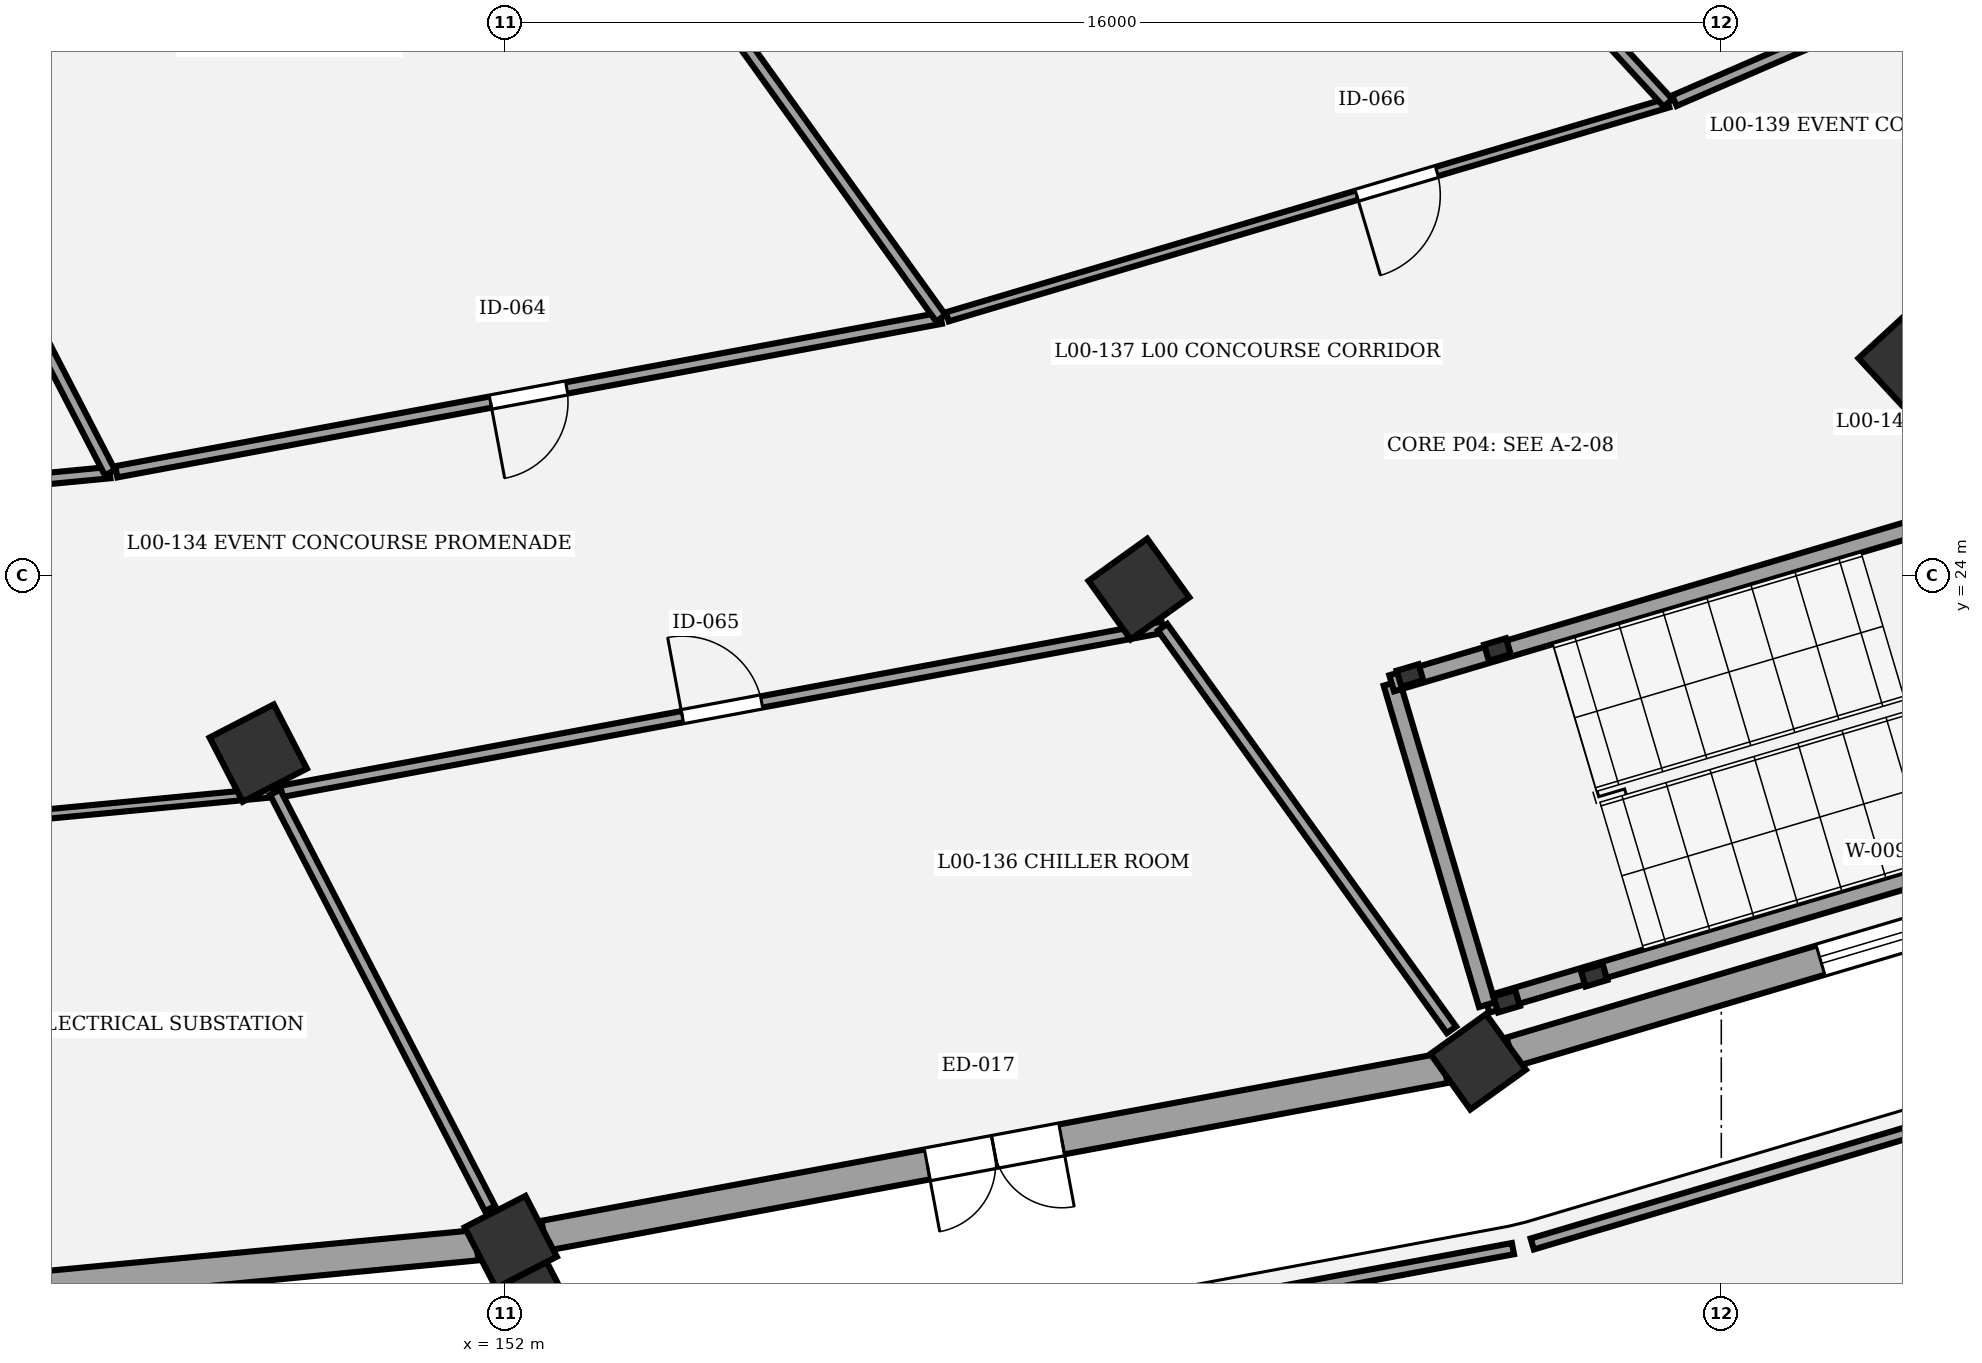
"""IFC4 building model, lengths in metres.
Left out: names, types, materials, properties, quantities, classifications, styles, units other than length and angle.
Written with IfcOpenShell. Run it as: python <this file> out.ifc"""

import sys

from ifc_helpers import new_model, si_unit, direction, frame, frame_2d, origin, origin_2d, place, context, subcontext, project, spatial, rectangle, extrude, element, fill, save


model = new_model("IFC4")
c1 = context("Model", 3, precision=1e-05, world=origin(), true_north=direction((0.0, 1.0)))
c2 = subcontext(c1, "Body", "Model", "MODEL_VIEW")
j1 = project(units=[si_unit("LENGTHUNIT", "METRE"), si_unit("PLANEANGLEUNIT", "RADIAN")], contexts=[c1])
p1 = place(None, origin())
s1 = spatial("IfcSite", under=j1, at=p1, CompositionType="ELEMENT")
p2 = place(p1, origin())
s2 = spatial("IfcBuilding", under=s1, at=p2, CompositionType="ELEMENT")
p3 = place(p2, origin())
s3 = spatial("IfcBuildingStorey", under=s2, at=p3, CompositionType="ELEMENT", Elevation=0.0)
p4 = place(p3, frame((148.75, 21.665, 0.0), z_axis=(0.0, 0.0, 1.0), x_axis=(0.458959712465, -0.888457079624, 0.0)))
e1 = element("IfcColumn", 1, at=p4, inside=s3, PredefinedType="COLUMN", context=c2, shape_type="SweptSolid", body=[
    extrude(rectangle(XDim=0.95, YDim=0.95, at=origin_2d()), origin(), (0.0, 0.0, 1.0), 5.4),
])
p5 = place(p3, frame((152.073, 15.233, 0.0), z_axis=(0.0, 0.0, 1.0), x_axis=(0.458959712465, -0.888457079624, 0.0)))
e2 = element("IfcColumn", 2, at=p5, inside=s3, PredefinedType="COLUMN", context=c2, shape_type="SweptSolid", body=[
    extrude(rectangle(XDim=0.9, YDim=0.9, at=origin_2d()), origin(), (0.0, 0.0, 1.0), 5.4),
])
p6 = place(p3, frame((152.373, 14.652, 0.0), z_axis=(0.0, 0.0, 1.0), x_axis=(0.888457079624, 0.458959712465, 0.0)))
e3 = element("IfcColumn", 3, at=p6, inside=s3, PredefinedType="PILASTER", context=c2, shape_type="SweptSolid", body=[
    extrude(rectangle(XDim=0.6, YDim=0.4, at=origin_2d()), origin(), (0.0, 0.0, 1.0), 5.4),
])
p7 = place(p3, frame((160.338, 23.823, 0.0), z_axis=(0.0, 0.0, 1.0), x_axis=(0.582974127943, -0.812490717577, 0.0)))
e4 = element("IfcColumn", 4, at=p7, inside=s3, PredefinedType="COLUMN", context=c2, shape_type="SweptSolid", body=[
    extrude(rectangle(XDim=0.95, YDim=0.95, at=origin_2d()), origin(), (0.0, 0.0, 1.0), 5.4),
])
p8 = place(p3, frame((164.801, 17.603, 0.0), z_axis=(0.0, 0.0, 1.0), x_axis=(0.582974127943, -0.812490717577, 0.0)))
e5 = element("IfcColumn", 5, at=p8, inside=s3, PredefinedType="COLUMN", context=c2, shape_type="SweptSolid", body=[
    extrude(rectangle(XDim=0.9, YDim=0.9, at=origin_2d()), origin(), (0.0, 0.0, 1.0), 5.4),
])
p9 = place(p3, frame((170.476, 26.832, 0.0), z_axis=(0.0, 0.0, 1.0), x_axis=(0.677903094969, -0.735151272753, 0.0)))
e6 = element("IfcColumn", 6, at=p9, inside=s3, PredefinedType="COLUMN", context=c2, shape_type="SweptSolid", body=[
    extrude(rectangle(XDim=0.95, YDim=0.95, at=origin_2d()), origin(), (0.0, 0.0, 1.0), 5.4),
])
p10 = place(p3, frame((151.627, 15.19, 0.0), z_axis=(0.0, 0.0, 1.0), x_axis=(-0.995482650467, -0.094943628644, 0.0)))
e7 = element("IfcWall", 7, at=p10, inside=s3, PredefinedType="STANDARD", context=c2, shape_type="SweptSolid", body=[
    extrude(rectangle(XDim=14.13, YDim=0.4, at=frame_2d((7.065, 0.0))), origin(), (0.0, 0.0, 1.0), 4.25),
])
p11 = place(p10, frame((6.215, 0.0, 0.0)))
e8 = element("IfcOpeningElement", 8, at=p11, cuts=e7, PredefinedType="OPENING", context=c2, shape_type="SweptSolid", body=[
    extrude(rectangle(XDim=1.7, YDim=2.35, at=frame_2d((0.85, 1.175))), frame((0.0, 0.21, 0.0), z_axis=(0.0, -1.0, 0.0), x_axis=(1.0, 0.0, 0.0)), (0.0, 0.0, 1.0), 0.42),
])
p12 = place(p3, frame((164.361, 17.521, 0.0), z_axis=(0.0, 0.0, 1.0), x_axis=(-0.983098943476, -0.183075031985, 0.0)))
e9 = element("IfcWall", 9, at=p12, inside=s3, PredefinedType="STANDARD", context=c2, shape_type="SweptSolid", body=[
    extrude(rectangle(XDim=12.051, YDim=0.4, at=frame_2d((6.026, 0.0))), origin(), (0.0, 0.0, 1.0), 4.25),
])
p13 = place(p12, frame((5.126, 0.0, 0.0)))
e10 = element("IfcOpeningElement", 10, at=p13, cuts=e9, PredefinedType="OPENING", context=c2, shape_type="SweptSolid", body=[
    extrude(rectangle(XDim=1.8, YDim=2.4, at=frame_2d((0.9, 1.2))), frame((0.0, 0.21, 0.0), z_axis=(0.0, -1.0, 0.0), x_axis=(1.0, 0.0, 0.0)), (0.0, 0.0, 1.0), 0.42),
])
p14 = place(p3, frame((175.508, 20.781, 0.0), z_axis=(0.0, 0.0, 1.0), x_axis=(-0.958660844814, -0.284551198593, 0.0)))
e11 = element("IfcWall", 11, at=p14, inside=s3, PredefinedType="STANDARD", context=c2, shape_type="SweptSolid", body=[
    extrude(rectangle(XDim=10.72, YDim=0.4, at=frame_2d((5.36, 0.0))), origin(), (0.0, 0.0, 1.0), 4.25),
])
p15 = place(p14, frame((4.25, 0.0, 1.1)))
e12 = element("IfcOpeningElement", 12, at=p15, cuts=e11, PredefinedType="OPENING", context=c2, shape_type="SweptSolid", body=[
    extrude(rectangle(XDim=2.22, YDim=1.55, at=frame_2d((1.11, 0.775))), frame((0.0, 0.21, 0.0), z_axis=(0.0, -1.0, 0.0), x_axis=(1.0, 0.0, 0.0)), (0.0, 0.0, 1.0), 0.42),
])
for number, where, z_axis, x_axis in (
    (13, (165.054, 23.027, 0.0), (0.0, 0.0, 1.0), (-0.959, -0.285, 0.0)),
    (14, (163.904, 22.686, 0.0), (0.0, 0.0, 1.0), (-0.959, -0.285, 0.0)),
    (15, (165.176, 18.4, 0.0), (0.0, 0.0, 1.0), (-0.959, -0.285, 0.0)),
    (16, (166.326, 18.742, 0.0), (0.0, 0.0, 1.0), (-0.959, -0.285, 0.0)),
):
    element("IfcColumn", number, at=place(p3, frame(where, z_axis=z_axis, x_axis=x_axis)), inside=s3, PredefinedType="COLUMN", context=c2, shape_type="SweptSolid", body=[
        extrude(rectangle(XDim=0.3, YDim=0.22, at=origin_2d()), origin(), (0.0, 0.0, 1.0), 5.4),
    ])
p16 = place(p3, frame((173.105, 20.785, 0.0), z_axis=(0.0, 0.0, 1.0), x_axis=(-0.958675743706, -0.284500998997, 0.0)))
e17 = element("IfcWall", 17, at=p16, inside=s3, PredefinedType="SHEAR", context=c2, shape_type="SweptSolid", body=[
    extrude(rectangle(XDim=8.54, YDim=0.22, at=frame_2d((4.27, 0.0))), origin(), (0.0, 0.0, 1.0), 5.15),
])
p17 = place(p3, frame((163.663, 22.583, 0.0), z_axis=(0.0, 0.0, 1.0), x_axis=(0.284497328872, -0.958676832861, 0.0)))
e18 = element("IfcWall", 18, at=p17, inside=s3, PredefinedType="SHEAR", context=c2, shape_type="SweptSolid", body=[
    extrude(rectangle(XDim=4.41, YDim=0.22, at=frame_2d((2.205, 0.0))), origin(), (0.0, 0.0, 1.0), 5.15),
])
p18 = place(p3, frame((171.85, 25.013, 0.0), z_axis=(0.0, 0.0, 1.0), x_axis=(-0.95867342973, -0.284508796227, 0.0)))
e19 = element("IfcWall", 19, at=p18, inside=s3, PredefinedType="SHEAR", context=c2, shape_type="SweptSolid", body=[
    extrude(rectangle(XDim=8.54, YDim=0.22, at=frame_2d((4.27, 0.0))), origin(), (0.0, 0.0, 1.0), 5.15),
])
p19 = place(p18, frame((0.3, 0.0, 0.0)))
e20 = element("IfcOpeningElement", 20, at=p19, cuts=e19, PredefinedType="OPENING", context=c2, shape_type="SweptSolid", body=[
    extrude(rectangle(XDim=1.15, YDim=2.15, at=frame_2d((0.575, 1.075))), frame((0.0, 0.12, 0.0), z_axis=(0.0, -1.0, 0.0), x_axis=(1.0, 0.0, 0.0)), (0.0, 0.0, 1.0), 0.24),
])
p20 = place(p3, frame((146.799, 25.355, 0.0), z_axis=(0.0, 0.0, 1.0), x_axis=(-0.995485111947, -0.094917816515, 0.0)))
e21 = element("IfcWall", 21, at=p20, inside=s3, PredefinedType="PARTITIONING", context=c2, shape_type="SweptSolid", body=[
    extrude(rectangle(XDim=12.822, YDim=0.15, at=frame_2d((6.411, 0.0))), origin(), (0.0, 0.0, 1.0), 4.15),
])
p21 = place(p20, frame((5.941, 0.0, 0.0)))
e22 = element("IfcOpeningElement", 22, at=p21, cuts=e21, PredefinedType="OPENING", context=c2, shape_type="SweptSolid", body=[
    extrude(rectangle(XDim=0.94, YDim=2.3, at=frame_2d((0.47, 1.15))), frame((0.0, 0.085, 0.0), z_axis=(0.0, -1.0, 0.0), x_axis=(1.0, 0.0, 0.0)), (0.0, 0.0, 1.0), 0.17),
])
p22 = place(p3, frame((135.681, 19.881, 0.0), z_axis=(0.0, 0.0, 1.0), x_axis=(0.995484535327, 0.094923863827, 0.0)))
e23 = element("IfcWall", 23, at=p22, inside=s3, PredefinedType="PARTITIONING", context=c2, shape_type="SweptSolid", body=[
    extrude(rectangle(XDim=13.351, YDim=0.125, at=frame_2d((6.676, 0.0))), origin(), (0.0, 0.0, 1.0), 4.15),
])
p23 = place(p22, frame((6.186, 0.0, 0.0)))
e24 = element("IfcOpeningElement", 24, at=p23, cuts=e23, PredefinedType="OPENING", context=c2, shape_type="SweptSolid", body=[
    extrude(rectangle(XDim=0.98, YDim=2.3, at=frame_2d((0.49, 1.15))), frame((0.0, 0.073, 0.0), z_axis=(0.0, -1.0, 0.0), x_axis=(1.0, 0.0, 0.0)), (0.0, 0.0, 1.0), 0.145),
])
p24 = place(p3, frame((157.732, 27.386, 0.0), z_axis=(0.0, 0.0, 1.0), x_axis=(-0.983097372707, -0.183083466695, 0.0)))
e25 = element("IfcWall", 25, at=p24, inside=s3, PredefinedType="PARTITIONING", context=c2, shape_type="SweptSolid", body=[
    extrude(rectangle(XDim=11.035, YDim=0.15, at=frame_2d((5.517, 0.0))), origin(), (0.0, 0.0, 1.0), 4.15),
])
p25 = place(p24, frame((5.007, 0.0, 0.0)))
e26 = element("IfcOpeningElement", 26, at=p25, cuts=e25, PredefinedType="OPENING", context=c2, shape_type="SweptSolid", body=[
    extrude(rectangle(XDim=1.02, YDim=2.3, at=frame_2d((0.51, 1.15))), frame((0.0, 0.085, 0.0), z_axis=(0.0, -1.0, 0.0), x_axis=(1.0, 0.0, 0.0)), (0.0, 0.0, 1.0), 0.17),
])
p26 = place(p3, frame((149.055, 21.161, 0.0), z_axis=(0.0, 0.0, 1.0), x_axis=(0.983095748229, 0.183092189385, 0.0)))
e27 = element("IfcWall", 27, at=p26, inside=s3, PredefinedType="PARTITIONING", context=c2, shape_type="SweptSolid", body=[
    extrude(rectangle(XDim=11.793, YDim=0.15, at=frame_2d((5.896, 0.0))), origin(), (0.0, 0.0, 1.0), 4.15),
])
p27 = place(p26, frame((5.366, 0.0, 0.0)))
e28 = element("IfcOpeningElement", 28, at=p27, cuts=e27, PredefinedType="OPENING", context=c2, shape_type="SweptSolid", body=[
    extrude(rectangle(XDim=1.06, YDim=2.3, at=frame_2d((0.53, 1.15))), frame((0.0, 0.085, 0.0), z_axis=(0.0, -1.0, 0.0), x_axis=(1.0, 0.0, 0.0)), (0.0, 0.0, 1.0), 0.17),
])
p28 = place(p3, frame((167.299, 30.219, 0.0), z_axis=(0.0, 0.0, 1.0), x_axis=(-0.958655809656, -0.284568161629, 0.0)))
e29 = element("IfcWall", 29, at=p28, inside=s3, PredefinedType="PARTITIONING", context=c2, shape_type="SweptSolid", body=[
    extrude(rectangle(XDim=9.891, YDim=0.125, at=frame_2d((4.946, 0.0))), origin(), (0.0, 0.0, 1.0), 4.15),
])
p29 = place(p28, frame((3.173, 0.0, 0.0)))
e30 = element("IfcOpeningElement", 30, at=p29, cuts=e29, PredefinedType="OPENING", context=c2, shape_type="SweptSolid", body=[
    extrude(rectangle(XDim=1.1, YDim=2.3, at=frame_2d((0.55, 1.15))), frame((0.0, 0.073, 0.0), z_axis=(0.0, -1.0, 0.0), x_axis=(1.0, 0.0, 0.0)), (0.0, 0.0, 1.0), 0.145),
])
p30 = place(p3, frame((175.685, 33.846, 0.0), z_axis=(0.0, 0.0, 1.0), x_axis=(-0.917494590455, -0.397748257677, 0.0)))
e31 = element("IfcWall", 31, at=p30, inside=s3, PredefinedType="PARTITIONING", context=c2, shape_type="SweptSolid", body=[
    extrude(rectangle(XDim=9.049, YDim=0.15, at=frame_2d((4.525, 0.0))), origin(), (0.0, 0.0, 1.0), 4.15),
])
p31 = place(p30, frame((1.774, 0.0, 0.0)))
e32 = element("IfcOpeningElement", 32, at=p31, cuts=e31, PredefinedType="OPENING", context=c2, shape_type="SweptSolid", body=[
    extrude(rectangle(XDim=1.14, YDim=2.3, at=frame_2d((0.57, 1.15))), frame((0.0, 0.085, 0.0), z_axis=(0.0, -1.0, 0.0), x_axis=(1.0, 0.0, 0.0)), (0.0, 0.0, 1.0), 0.17),
])
p32 = place(p3, frame((141.033, 36.517, 0.0), z_axis=(0.0, 0.0, 1.0), x_axis=(0.458958189589, -0.888457866311, 0.0)))
e33 = element("IfcWall", 33, at=p32, inside=s3, PredefinedType="PARTITIONING", context=c2, shape_type="SweptSolid", body=[
    extrude(rectangle(XDim=12.564, YDim=0.15, at=frame_2d((6.282, 0.0))), origin(), (0.0, 0.0, 1.0), 4.15),
])
p33 = place(p3, frame((148.972, 21.148, 0.0), z_axis=(0.0, 0.0, 1.0), x_axis=(0.45896480759, -0.888454447563, 0.0)))
e34 = element("IfcWall", 34, at=p33, inside=s3, PredefinedType="PARTITIONING", context=c2, shape_type="SweptSolid", body=[
    extrude(rectangle(XDim=6.163, YDim=0.15, at=frame_2d((3.081, 0.0))), origin(), (0.0, 0.0, 1.0), 4.15),
])
p34 = place(p3, frame((149.984, 38.182, 0.0), z_axis=(0.0, 0.0, 1.0), x_axis=(0.583032067708, -0.812449141808, 0.0)))
e35 = element("IfcWall", 35, at=p34, inside=s3, PredefinedType="PARTITIONING", context=c2, shape_type="SweptSolid", body=[
    extrude(rectangle(XDim=13.288, YDim=0.15, at=frame_2d((6.644, 0.0))), origin(), (0.0, 0.0, 1.0), 4.15),
])
p35 = place(p3, frame((160.649, 23.32, 0.0), z_axis=(0.0, 0.0, 1.0), x_axis=(0.58306104439, -0.812428346696, 0.0)))
e36 = element("IfcWall", 36, at=p35, inside=s3, PredefinedType="PARTITIONING", context=c2, shape_type="SweptSolid", body=[
    extrude(rectangle(XDim=6.52, YDim=0.15, at=frame_2d((3.26, 0.0))), origin(), (0.0, 0.0, 1.0), 4.15),
])
p36 = place(p3, frame((157.816, 40.504, 0.0), z_axis=(0.0, 0.0, 1.0), x_axis=(0.677850870133, -0.735199427271, 0.0)))
e37 = element("IfcWall", 37, at=p36, inside=s3, PredefinedType="PARTITIONING", context=c2, shape_type="SweptSolid", body=[
    extrude(rectangle(XDim=13.989, YDim=0.15, at=frame_2d((6.995, 0.0))), origin(), (0.0, 0.0, 1.0), 4.15),
])
p37 = place(p3, frame((152.531, 12.775, 0.0), z_axis=(0.0, 0.0, 1.0), x_axis=(0.983094545276, 0.183098648406, 0.0)))
e38 = element("IfcWall", 38, at=p37, inside=s3, PredefinedType="PARTITIONING", context=c2, shape_type="SweptSolid", body=[
    extrude(rectangle(XDim=12.947, YDim=0.15, at=frame_2d((6.474, 0.0))), origin(), (0.0, 0.0, 1.0), 4.15),
])
p38 = place(p3, frame((165.513, 15.207, 0.0), z_axis=(0.0, 0.0, 1.0), x_axis=(0.95866000112, 0.284554041006, 0.0)))
e39 = element("IfcWall", 39, at=p38, inside=s3, PredefinedType="PARTITIONING", context=c2, shape_type="SweptSolid", body=[
    extrude(rectangle(XDim=8.478, YDim=0.15, at=frame_2d((4.239, 0.0))), origin(), (0.0, 0.0, 1.0), 4.15),
])
p39 = place(p13, origin())
e40 = element("IfcDoor", 40, at=p39, inside=s3, OperationType="DOUBLE_DOOR_SINGLE_SWING", PredefinedType="DOOR", context=c2, shape_type="SweptSolid", body=[
    extrude(rectangle(XDim=1.8, YDim=2.4, at=frame_2d((0.9, 1.2))), frame((0.0, 0.025, 0.0), z_axis=(0.0, -1.0, 0.0), x_axis=(1.0, 0.0, 0.0)), (0.0, 0.0, 1.0), 0.05),
])
fill(e10, e40)
p40 = place(p15, origin())
e41 = element("IfcWindow", 41, at=p40, inside=s3, PartitioningType="SINGLE_PANEL", PredefinedType="WINDOW", context=c2, shape_type="SweptSolid", body=[
    extrude(rectangle(XDim=2.22, YDim=1.55, at=frame_2d((1.11, 0.775))), frame((0.0, 0.03, 0.0), z_axis=(0.0, -1.0, 0.0), x_axis=(1.0, 0.0, 0.0)), (0.0, 0.0, 1.0), 0.06),
])
fill(e12, e41)
p41 = place(p25, origin())
e42 = element("IfcDoor", 42, at=p41, inside=s3, OperationType="SINGLE_SWING_RIGHT", PredefinedType="DOOR", context=c2, shape_type="SweptSolid", body=[
    extrude(rectangle(XDim=1.02, YDim=2.3, at=frame_2d((0.51, 1.15))), frame((0.0, 0.025, 0.0), z_axis=(0.0, -1.0, 0.0), x_axis=(1.0, 0.0, 0.0)), (0.0, 0.0, 1.0), 0.05),
])
fill(e26, e42)
p42 = place(p27, origin())
e43 = element("IfcDoor", 43, at=p42, inside=s3, OperationType="SINGLE_SWING_LEFT", PredefinedType="DOOR", context=c2, shape_type="SweptSolid", body=[
    extrude(rectangle(XDim=1.06, YDim=2.3, at=frame_2d((0.53, 1.15))), frame((0.0, 0.025, 0.0), z_axis=(0.0, -1.0, 0.0), x_axis=(1.0, 0.0, 0.0)), (0.0, 0.0, 1.0), 0.05),
])
fill(e28, e43)
p43 = place(p29, origin())
e44 = element("IfcDoor", 44, at=p43, inside=s3, OperationType="SINGLE_SWING_RIGHT", PredefinedType="DOOR", context=c2, shape_type="SweptSolid", body=[
    extrude(rectangle(XDim=1.1, YDim=2.3, at=frame_2d((0.55, 1.15))), frame((0.0, 0.025, 0.0), z_axis=(0.0, -1.0, 0.0), x_axis=(1.0, 0.0, 0.0)), (0.0, 0.0, 1.0), 0.05),
])
fill(e30, e44)
save(model, sys.argv[1])
